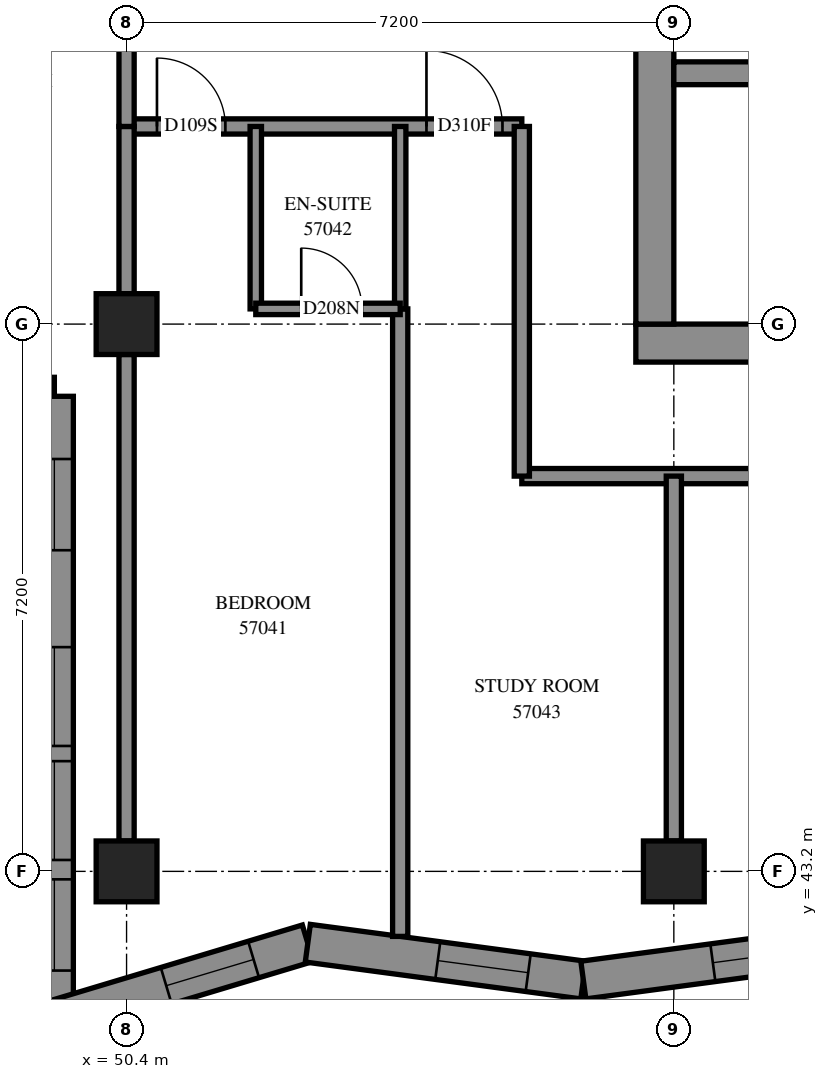
"""IFC4 building model, lengths in metres.
Left out: names, types, materials, properties, quantities, classifications, styles, units other than length and angle.
Written with IfcOpenShell. Run it as: python <this file> out.ifc"""

import sys

from ifc_helpers import new_model, si_unit, direction, frame, frame_2d, origin, origin_2d, place, context, subcontext, project, spatial, polyline, rectangle, outline, extrude, element, fill, save


model = new_model("IFC4")
c1 = context("Model", 3, precision=1e-05, world=origin(), true_north=direction((0.0, 1.0)))
c2 = subcontext(c1, "Body", "Model", "MODEL_VIEW")
j1 = project(units=[si_unit("LENGTHUNIT", "METRE"), si_unit("PLANEANGLEUNIT", "RADIAN")], contexts=[c1])
p1 = place(None, origin())
s1 = spatial("IfcSite", under=j1, at=p1, CompositionType="ELEMENT")
p2 = place(p1, origin())
s2 = spatial("IfcBuilding", under=s1, at=p2, CompositionType="ELEMENT")
p3 = place(p2, frame((0.0, 0.0, 210.0)))
s3 = spatial("IfcBuildingStorey", under=s2, at=p3, CompositionType="ELEMENT", Elevation=210.0)
for number, where, z_axis, x_axis in (
    (1, (50.4, 43.2, 0.0), (0.0, 0.0, 1.0), (1.0, 0.0, 0.0)),
    (2, (50.4, 50.4, 0.0), (0.0, 0.0, 1.0), (1.0, 0.0, 0.0)),
    (3, (57.6, 43.2, 0.0), (0.0, 0.0, 1.0), (1.0, 0.0, 0.0)),
):
    element("IfcColumn", number, at=place(p3, frame(where, z_axis=z_axis, x_axis=x_axis)), inside=s3, PredefinedType="COLUMN", context=c2, shape_type="SweptSolid", body=[
        extrude(rectangle(XDim=0.8, YDim=0.8, at=origin_2d()), origin(), (0.0, 0.0, 1.0), 3.1),
    ])
p4 = place(p3, frame((57.1, 50.15, -0.3), z_axis=(0.0, 0.0, 1.0), x_axis=(1.0, 0.0, 0.0)))
e4 = element("IfcWall", 4, at=p4, inside=s3, PredefinedType="SHEAR", context=c2, shape_type="SweptSolid", body=[
    extrude(rectangle(XDim=15.4, YDim=0.5, at=frame_2d((7.7, 0.0))), origin(), (0.0, 0.0, 1.0), 2.7),
])
p5 = place(p3, frame((57.35, 50.4, -0.3), z_axis=(0.0, 0.0, 1.0), x_axis=(0.0, 1.0, 0.0)))
e5 = element("IfcWall", 5, at=p5, inside=s3, PredefinedType="SHEAR", context=c2, shape_type="SweptSolid", body=[
    extrude(rectangle(XDim=14.4, YDim=0.5, at=frame_2d((7.2, 0.0))), origin(), (0.0, 0.0, 1.0), 2.7),
])
p6 = place(p5, frame((4.55, 0.0, 0.3)))
e6 = element("IfcOpeningElement", 6, at=p6, cuts=e5, PredefinedType="OPENING", context=c2, shape_type="SweptSolid", body=[
    extrude(rectangle(XDim=1.1, YDim=2.1, at=frame_2d((0.55, 1.05))), frame((0.0, 0.26, 0.0), z_axis=(0.0, -1.0, 0.0), x_axis=(1.0, 0.0, 0.0)), (0.0, 0.0, 1.0), 0.52),
])
p7 = place(p5, frame((11.35, 0.0, 0.3)))
e7 = element("IfcOpeningElement", 7, at=p7, cuts=e5, PredefinedType="OPENING", context=c2, shape_type="SweptSolid", body=[
    extrude(rectangle(XDim=1.1, YDim=2.1, at=frame_2d((0.55, 1.05))), frame((0.0, 0.26, 0.0), z_axis=(0.0, -1.0, 0.0), x_axis=(1.0, 0.0, 0.0)), (0.0, 0.0, 1.0), 0.52),
])
p8 = place(p3, frame((57.6, 53.7, 0.0), z_axis=(0.0, 0.0, 1.0), x_axis=(1.0, 0.0, 0.0)))
e8 = element("IfcWall", 8, at=p8, inside=s3, PredefinedType="SOLIDWALL", context=c2, shape_type="SweptSolid", body=[
    extrude(rectangle(XDim=14.4, YDim=0.3, at=frame_2d((7.2, 0.0))), origin(), (0.0, 0.0, 1.0), 3.1),
])
p9 = place(p8, frame((1.35, 0.0, 0.0)))
e9 = element("IfcOpeningElement", 9, at=p9, cuts=e8, PredefinedType="OPENING", context=c2, shape_type="SweptSolid", body=[
    extrude(rectangle(XDim=0.9, YDim=2.1, at=frame_2d((0.45, 1.05))), frame((0.0, 0.16, 0.0), z_axis=(0.0, -1.0, 0.0), x_axis=(1.0, 0.0, 0.0)), (0.0, 0.0, 1.0), 0.32),
])
p10 = place(p8, frame((4.95, 0.0, 0.0)))
e10 = element("IfcOpeningElement", 10, at=p10, cuts=e8, PredefinedType="OPENING", context=c2, shape_type="SweptSolid", body=[
    extrude(rectangle(XDim=0.9, YDim=2.1, at=frame_2d((0.45, 1.05))), frame((0.0, 0.16, 0.0), z_axis=(0.0, -1.0, 0.0), x_axis=(1.0, 0.0, 0.0)), (0.0, 0.0, 1.0), 0.32),
])
p11 = place(p8, frame((8.55, 0.0, 0.0)))
e11 = element("IfcOpeningElement", 11, at=p11, cuts=e8, PredefinedType="OPENING", context=c2, shape_type="SweptSolid", body=[
    extrude(rectangle(XDim=0.9, YDim=2.1, at=frame_2d((0.45, 1.05))), frame((0.0, 0.16, 0.0), z_axis=(0.0, -1.0, 0.0), x_axis=(1.0, 0.0, 0.0)), (0.0, 0.0, 1.0), 0.32),
])
p12 = place(p8, frame((12.05, 0.0, 0.0)))
e12 = element("IfcOpeningElement", 12, at=p12, cuts=e8, PredefinedType="OPENING", context=c2, shape_type="SweptSolid", body=[
    extrude(rectangle(XDim=1.1, YDim=2.1, at=frame_2d((0.55, 1.05))), frame((0.0, 0.16, 0.0), z_axis=(0.0, -1.0, 0.0), x_axis=(1.0, 0.0, 0.0)), (0.0, 0.0, 1.0), 0.32),
])
p13 = place(p3, frame((42.25, 49.45, 0.0), z_axis=(0.0, 0.0, 1.0), x_axis=(1.0, 0.0, 0.0)))
e13 = element("IfcWall", 13, at=p13, inside=s3, PredefinedType="SOLIDWALL", context=c2, shape_type="SweptSolid", body=[
    extrude(outline(polyline([(-0.25, -0.25), (6.95, -0.25), (7.45, 0.25), (0.25, 0.25), (-0.25, -0.25)])), origin(), (0.0, 0.0, 1.0), 3.1),
])
p14 = place(p13, frame((1.35, 0.0, 0.45)))
e14 = element("IfcOpeningElement", 14, at=p14, cuts=e13, PredefinedType="OPENING", context=c2, shape_type="SweptSolid", body=[
    extrude(rectangle(XDim=1.3, YDim=2.5, at=frame_2d((0.65, 1.25))), frame((0.0, 0.26, 0.0), z_axis=(0.0, -1.0, 0.0), x_axis=(1.0, 0.0, 0.0)), (0.0, 0.0, 1.0), 0.52),
])
p15 = place(p13, frame((2.85, 0.0, 0.45)))
e15 = element("IfcOpeningElement", 15, at=p15, cuts=e13, PredefinedType="OPENING", context=c2, shape_type="SweptSolid", body=[
    extrude(rectangle(XDim=1.3, YDim=2.5, at=frame_2d((0.65, 1.25))), frame((0.0, 0.26, 0.0), z_axis=(0.0, -1.0, 0.0), x_axis=(1.0, 0.0, 0.0)), (0.0, 0.0, 1.0), 0.52),
])
p16 = place(p13, frame((5.175, 0.0, 0.45)))
e16 = element("IfcOpeningElement", 16, at=p16, cuts=e13, PredefinedType="OPENING", context=c2, shape_type="SweptSolid", body=[
    extrude(rectangle(XDim=1.2, YDim=2.5, at=frame_2d((0.6, 1.25))), frame((0.0, 0.26, 0.0), z_axis=(0.0, -1.0, 0.0), x_axis=(1.0, 0.0, 0.0)), (0.0, 0.0, 1.0), 0.52),
])
p17 = place(p3, frame((49.45, 49.45, 0.0), z_axis=(0.0, 0.0, 1.0), x_axis=(0.0, -1.0, 0.0)))
e17 = element("IfcWall", 17, at=p17, inside=s3, PredefinedType="SOLIDWALL", context=c2, shape_type="SweptSolid", body=[
    extrude(outline(polyline([(0.25, -0.25), (8.532, -0.25), (7.86, 0.25), (-0.25, 0.25), (0.25, -0.25)])), origin(), (0.0, 0.0, 1.0), 3.1),
])
p18 = place(p17, frame((3.3, 0.0, 0.45)))
e18 = element("IfcOpeningElement", 18, at=p18, cuts=e17, PredefinedType="OPENING", context=c2, shape_type="SweptSolid", body=[
    extrude(rectangle(XDim=1.3, YDim=2.5, at=frame_2d((0.65, 1.25))), frame((0.0, 0.26, 0.0), z_axis=(0.0, -1.0, 0.0), x_axis=(1.0, 0.0, 0.0)), (0.0, 0.0, 1.0), 0.52),
])
p19 = place(p17, frame((4.8, 0.0, 0.45)))
e19 = element("IfcOpeningElement", 19, at=p19, cuts=e17, PredefinedType="OPENING", context=c2, shape_type="SweptSolid", body=[
    extrude(rectangle(XDim=1.3, YDim=2.5, at=frame_2d((0.65, 1.25))), frame((0.0, 0.26, 0.0), z_axis=(0.0, -1.0, 0.0), x_axis=(1.0, 0.0, 0.0)), (0.0, 0.0, 1.0), 0.52),
])
p20 = place(p17, frame((0.825, 0.0, 0.45)))
e20 = element("IfcOpeningElement", 20, at=p20, cuts=e17, PredefinedType="OPENING", context=c2, shape_type="SweptSolid", body=[
    extrude(rectangle(XDim=1.2, YDim=2.5, at=frame_2d((0.6, 1.25))), frame((0.0, 0.26, 0.0), z_axis=(0.0, -1.0, 0.0), x_axis=(1.0, 0.0, 0.0)), (0.0, 0.0, 1.0), 0.52),
])
p21 = place(p17, frame((6.355, 0.0, 0.45)))
e21 = element("IfcOpeningElement", 21, at=p21, cuts=e17, PredefinedType="OPENING", context=c2, shape_type="SweptSolid", body=[
    extrude(rectangle(XDim=1.2, YDim=2.5, at=frame_2d((0.6, 1.25))), frame((0.0, 0.26, 0.0), z_axis=(0.0, -1.0, 0.0), x_axis=(1.0, 0.0, 0.0)), (0.0, 0.0, 1.0), 0.52),
])
p22 = place(p3, frame((49.45, 41.254, 0.0), z_axis=(0.0, 0.0, 1.0), x_axis=(0.9577907027, 0.2874664673, 0.0)))
e22 = element("IfcWall", 22, at=p22, inside=s3, PredefinedType="SOLIDWALL", context=c2, shape_type="SweptSolid", body=[
    extrude(outline(polyline([(-0.336, -0.25), (3.428, -0.25), (3.535, 0.25), (0.336, 0.25), (-0.336, -0.25)])), origin(), (0.0, 0.0, 1.0), 3.1),
])
p23 = place(p22, frame((1.537, 0.0, 0.45)))
e23 = element("IfcOpeningElement", 23, at=p23, cuts=e22, PredefinedType="OPENING", context=c2, shape_type="SweptSolid", body=[
    extrude(rectangle(XDim=1.2, YDim=2.5, at=frame_2d((0.6, 1.25))), frame((0.0, 0.26, 0.0), z_axis=(0.0, -1.0, 0.0), x_axis=(1.0, 0.0, 0.0)), (0.0, 0.0, 1.0), 0.52),
])
p24 = place(p3, frame((52.785, 42.255, 0.0), z_axis=(0.0, 0.0, 1.0), x_axis=(0.9911788782, -0.1325308696, 0.0)))
e24 = element("IfcWall", 24, at=p24, inside=s3, PredefinedType="SOLIDWALL", context=c2, shape_type="SweptSolid", body=[
    extrude(outline(polyline([(0.054, -0.25), (3.691, -0.25), (3.624, 0.25), (-0.054, 0.25), (0.054, -0.25)])), origin(), (0.0, 0.0, 1.0), 3.1),
])
p25 = place(p24, frame((1.725, 0.0, 0.45)))
e25 = element("IfcOpeningElement", 25, at=p25, cuts=e24, PredefinedType="OPENING", context=c2, shape_type="SweptSolid", body=[
    extrude(rectangle(XDim=1.2, YDim=2.5, at=frame_2d((0.6, 1.25))), frame((0.0, 0.26, 0.0), z_axis=(0.0, -1.0, 0.0), x_axis=(1.0, 0.0, 0.0)), (0.0, 0.0, 1.0), 0.52),
])
p26 = place(p3, frame((56.41, 41.77, 0.0), z_axis=(0.0, 0.0, 1.0), x_axis=(0.991178361, 0.132534738, 0.0)))
e26 = element("IfcWall", 26, at=p26, inside=s3, PredefinedType="SOLIDWALL", context=c2, shape_type="SweptSolid", body=[
    extrude(outline(polyline([(-0.033, -0.25), (3.603, -0.25), (3.67, 0.25), (0.033, 0.25), (-0.033, -0.25)])), origin(), (0.0, 0.0, 1.0), 3.1),
])
p27 = place(p26, frame((1.719, 0.0, 0.45)))
e27 = element("IfcOpeningElement", 27, at=p27, cuts=e26, PredefinedType="OPENING", context=c2, shape_type="SweptSolid", body=[
    extrude(rectangle(XDim=1.2, YDim=2.5, at=frame_2d((0.6, 1.25))), frame((0.0, 0.26, 0.0), z_axis=(0.0, -1.0, 0.0), x_axis=(1.0, 0.0, 0.0)), (0.0, 0.0, 1.0), 0.52),
])
p28 = place(p3, frame((55.6, 48.4, 0.0), z_axis=(0.0, 0.0, 1.0), x_axis=(1.0, 0.0, 0.0)))
e28 = element("IfcWall", 28, at=p28, inside=s3, PredefinedType="PARTITIONING", context=c2, shape_type="SweptSolid", body=[
    extrude(rectangle(XDim=18.4, YDim=0.2, at=frame_2d((9.2, 0.0))), origin(), (0.0, 0.0, 1.0), 3.1),
])
p29 = place(p28, frame((5.862, 0.0, 0.0)))
e29 = element("IfcOpeningElement", 29, at=p29, cuts=e28, PredefinedType="OPENING", context=c2, shape_type="SweptSolid", body=[
    extrude(rectangle(XDim=1.0, YDim=2.1, at=frame_2d((0.5, 1.05))), frame((0.0, 0.11, 0.0), z_axis=(0.0, -1.0, 0.0), x_axis=(1.0, 0.0, 0.0)), (0.0, 0.0, 1.0), 0.22),
])
p30 = place(p28, frame((13.099, 0.0, 0.0)))
e30 = element("IfcOpeningElement", 30, at=p30, cuts=e28, PredefinedType="OPENING", context=c2, shape_type="SweptSolid", body=[
    extrude(rectangle(XDim=0.9, YDim=2.1, at=frame_2d((0.45, 1.05))), frame((0.0, 0.11, 0.0), z_axis=(0.0, -1.0, 0.0), x_axis=(1.0, 0.0, 0.0)), (0.0, 0.0, 1.0), 0.22),
])
p31 = place(p3, frame((54.0, 42.345, 0.0), z_axis=(0.0, 0.0, 1.0), x_axis=(0.0, 1.0, 0.0)))
e31 = element("IfcWall", 31, at=p31, inside=s3, PredefinedType="PARTITIONING", context=c2, shape_type="SweptSolid", body=[
    extrude(rectangle(XDim=8.255, YDim=0.2, at=frame_2d((4.128, 0.0))), origin(), (0.0, 0.0, 1.0), 3.1),
])
p32 = place(p3, frame((50.4, 43.6, 0.0), z_axis=(0.0, 0.0, 1.0), x_axis=(0.0, 1.0, 0.0)))
e32 = element("IfcWall", 32, at=p32, inside=s3, PredefinedType="PARTITIONING", context=c2, shape_type="SweptSolid", body=[
    extrude(rectangle(XDim=6.4, YDim=0.2, at=frame_2d((3.2, 0.0))), origin(), (0.0, 0.0, 1.0), 2.6),
])
p33 = place(p3, frame((50.4, 53.0, 0.0), z_axis=(0.0, 0.0, 1.0), x_axis=(1.0, 0.0, 0.0)))
e33 = element("IfcWall", 33, at=p33, inside=s3, PredefinedType="PARTITIONING", context=c2, shape_type="SweptSolid", body=[
    extrude(rectangle(XDim=5.2, YDim=0.2, at=frame_2d((2.6, 0.0))), origin(), (0.0, 0.0, 1.0), 3.1),
])
p34 = place(p33, frame((0.4, 0.0, 0.0)))
e34 = element("IfcOpeningElement", 34, at=p34, cuts=e33, PredefinedType="OPENING", context=c2, shape_type="SweptSolid", body=[
    extrude(rectangle(XDim=0.9, YDim=2.1, at=frame_2d((0.45, 1.05))), frame((0.0, 0.11, 0.0), z_axis=(0.0, -1.0, 0.0), x_axis=(1.0, 0.0, 0.0)), (0.0, 0.0, 1.0), 0.22),
])
p35 = place(p33, frame((3.946, 0.0, 0.0)))
e35 = element("IfcOpeningElement", 35, at=p35, cuts=e33, PredefinedType="OPENING", context=c2, shape_type="SweptSolid", body=[
    extrude(rectangle(XDim=1.0, YDim=2.1, at=frame_2d((0.5, 1.05))), frame((0.0, 0.11, 0.0), z_axis=(0.0, -1.0, 0.0), x_axis=(1.0, 0.0, 0.0)), (0.0, 0.0, 1.0), 0.22),
])
p36 = place(p3, frame((57.6, 43.6, 0.0), z_axis=(0.0, 0.0, 1.0), x_axis=(0.0, 1.0, 0.0)))
e36 = element("IfcWall", 36, at=p36, inside=s3, PredefinedType="PARTITIONING", context=c2, shape_type="SweptSolid", body=[
    extrude(rectangle(XDim=4.8, YDim=0.2, at=frame_2d((2.4, 0.0))), origin(), (0.0, 0.0, 1.0), 3.1),
])
p37 = place(p3, frame((55.6, 48.4, 0.0), z_axis=(0.0, 0.0, 1.0), x_axis=(0.0, 1.0, 0.0)))
e37 = element("IfcWall", 37, at=p37, inside=s3, PredefinedType="PARTITIONING", context=c2, shape_type="SweptSolid", body=[
    extrude(rectangle(XDim=4.6, YDim=0.2, at=frame_2d((2.3, 0.0))), origin(), (0.0, 0.0, 1.0), 3.1),
])
for number, where, z_axis, x_axis in (
    (38, (52.1, 50.6, 0.0), (0.0, 0.0, 1.0), (0.0, 1.0, 0.0)),
    (39, (54.0, 50.6, 0.0), (0.0, 0.0, 1.0), (0.0, 1.0, 0.0)),
):
    element("IfcWall", number, at=place(p3, frame(where, z_axis=z_axis, x_axis=x_axis)), inside=s3, PredefinedType="PARTITIONING", context=c2, shape_type="SweptSolid", body=[
        extrude(rectangle(XDim=2.4, YDim=0.15, at=frame_2d((1.2, 0.0))), origin(), (0.0, 0.0, 1.0), 3.1),
    ])
p38 = place(p3, frame((50.4, 50.8, 0.0), z_axis=(0.0, 0.0, 1.0), x_axis=(0.0, 1.0, 0.0)))
e40 = element("IfcWall", 40, at=p38, inside=s3, PredefinedType="PARTITIONING", context=c2, shape_type="SweptSolid", body=[
    extrude(rectangle(XDim=2.2, YDim=0.2, at=frame_2d((1.1, 0.0))), origin(), (0.0, 0.0, 1.0), 3.1),
])
p39 = place(p3, frame((50.4, 53.0, 0.0), z_axis=(0.0, 0.0, 1.0), x_axis=(0.0, 1.0, 0.0)))
e41 = element("IfcWall", 41, at=p39, inside=s3, PredefinedType="PARTITIONING", context=c2, shape_type="SweptSolid", body=[
    extrude(rectangle(XDim=2.0, YDim=0.2, at=frame_2d((1.0, 0.0))), origin(), (0.0, 0.0, 1.0), 3.1),
])
p40 = place(p3, frame((52.1, 50.6, 0.0), z_axis=(0.0, 0.0, 1.0), x_axis=(1.0, 0.0, 0.0)))
e42 = element("IfcWall", 42, at=p40, inside=s3, PredefinedType="PARTITIONING", context=c2, shape_type="SweptSolid", body=[
    extrude(rectangle(XDim=1.9, YDim=0.15, at=frame_2d((0.95, 0.0))), origin(), (0.0, 0.0, 1.0), 3.1),
])
p41 = place(p40, frame((0.598, 0.0, 0.0)))
e43 = element("IfcOpeningElement", 43, at=p41, cuts=e42, PredefinedType="OPENING", context=c2, shape_type="SweptSolid", body=[
    extrude(rectangle(XDim=0.8, YDim=2.1, at=frame_2d((0.4, 1.05))), frame((0.0, 0.085, 0.0), z_axis=(0.0, -1.0, 0.0), x_axis=(1.0, 0.0, 0.0)), (0.0, 0.0, 1.0), 0.17),
])
p42 = place(p18, origin())
e44 = element("IfcWindow", 44, at=p42, inside=s3, PartitioningType="SINGLE_PANEL", PredefinedType="WINDOW", context=c2, shape_type="SweptSolid", body=[
    extrude(rectangle(XDim=1.3, YDim=2.5, at=frame_2d((0.65, 1.25))), frame((0.0, 0.18, 0.0), z_axis=(0.0, -1.0, 0.0), x_axis=(1.0, 0.0, 0.0)), (0.0, 0.0, 1.0), 0.06),
])
fill(e18, e44)
p43 = place(p19, origin())
e45 = element("IfcWindow", 45, at=p43, inside=s3, PartitioningType="SINGLE_PANEL", PredefinedType="WINDOW", context=c2, shape_type="SweptSolid", body=[
    extrude(rectangle(XDim=1.3, YDim=2.5, at=frame_2d((0.65, 1.25))), frame((0.0, 0.18, 0.0), z_axis=(0.0, -1.0, 0.0), x_axis=(1.0, 0.0, 0.0)), (0.0, 0.0, 1.0), 0.06),
])
fill(e19, e45)
p44 = place(p20, origin())
e46 = element("IfcWindow", 46, at=p44, inside=s3, PartitioningType="SINGLE_PANEL", PredefinedType="WINDOW", context=c2, shape_type="SweptSolid", body=[
    extrude(rectangle(XDim=1.2, YDim=2.5, at=frame_2d((0.6, 1.25))), frame((0.0, 0.18, 0.0), z_axis=(0.0, -1.0, 0.0), x_axis=(1.0, 0.0, 0.0)), (0.0, 0.0, 1.0), 0.06),
])
fill(e20, e46)
p45 = place(p21, origin())
e47 = element("IfcWindow", 47, at=p45, inside=s3, PartitioningType="SINGLE_PANEL", PredefinedType="WINDOW", context=c2, shape_type="SweptSolid", body=[
    extrude(rectangle(XDim=1.2, YDim=2.5, at=frame_2d((0.6, 1.25))), frame((0.0, 0.18, 0.0), z_axis=(0.0, -1.0, 0.0), x_axis=(1.0, 0.0, 0.0)), (0.0, 0.0, 1.0), 0.06),
])
fill(e21, e47)
p46 = place(p23, origin())
e48 = element("IfcWindow", 48, at=p46, inside=s3, PartitioningType="SINGLE_PANEL", PredefinedType="WINDOW", context=c2, shape_type="SweptSolid", body=[
    extrude(rectangle(XDim=1.2, YDim=2.5, at=frame_2d((0.6, 1.25))), frame((0.0, 0.18, 0.0), z_axis=(0.0, -1.0, 0.0), x_axis=(1.0, 0.0, 0.0)), (0.0, 0.0, 1.0), 0.06),
])
fill(e23, e48)
p47 = place(p25, origin())
e49 = element("IfcWindow", 49, at=p47, inside=s3, PartitioningType="SINGLE_PANEL", PredefinedType="WINDOW", context=c2, shape_type="SweptSolid", body=[
    extrude(rectangle(XDim=1.2, YDim=2.5, at=frame_2d((0.6, 1.25))), frame((0.0, 0.18, 0.0), z_axis=(0.0, -1.0, 0.0), x_axis=(1.0, 0.0, 0.0)), (0.0, 0.0, 1.0), 0.06),
])
fill(e25, e49)
p48 = place(p27, origin())
e50 = element("IfcWindow", 50, at=p48, inside=s3, PartitioningType="SINGLE_PANEL", PredefinedType="WINDOW", context=c2, shape_type="SweptSolid", body=[
    extrude(rectangle(XDim=1.2, YDim=2.5, at=frame_2d((0.6, 1.25))), frame((0.0, 0.18, 0.0), z_axis=(0.0, -1.0, 0.0), x_axis=(1.0, 0.0, 0.0)), (0.0, 0.0, 1.0), 0.06),
])
fill(e27, e50)
p49 = place(p34, origin())
e51 = element("IfcDoor", 51, at=p49, inside=s3, OperationType="SINGLE_SWING_LEFT", PredefinedType="DOOR", context=c2, shape_type="SweptSolid", body=[
    extrude(rectangle(XDim=0.9, YDim=2.1, at=frame_2d((0.45, 1.05))), frame((0.0, 0.025, 0.0), z_axis=(0.0, -1.0, 0.0), x_axis=(1.0, 0.0, 0.0)), (0.0, 0.0, 1.0), 0.05),
])
fill(e34, e51)
p50 = place(p41, origin())
e52 = element("IfcDoor", 52, at=p50, inside=s3, OperationType="SINGLE_SWING_RIGHT", PredefinedType="DOOR", context=c2, shape_type="SweptSolid", body=[
    extrude(rectangle(XDim=0.8, YDim=2.1, at=frame_2d((0.4, 1.05))), frame((0.0, 0.025, 0.0), z_axis=(0.0, -1.0, 0.0), x_axis=(1.0, 0.0, 0.0)), (0.0, 0.0, 1.0), 0.05),
])
fill(e43, e52)
p51 = place(p35, origin())
e53 = element("IfcDoor", 53, at=p51, inside=s3, OperationType="SINGLE_SWING_RIGHT", PredefinedType="DOOR", context=c2, shape_type="SweptSolid", body=[
    extrude(rectangle(XDim=1.0, YDim=2.1, at=frame_2d((0.5, 1.05))), frame((0.0, 0.025, 0.0), z_axis=(0.0, -1.0, 0.0), x_axis=(1.0, 0.0, 0.0)), (0.0, 0.0, 1.0), 0.05),
])
fill(e35, e53)
save(model, sys.argv[1])
